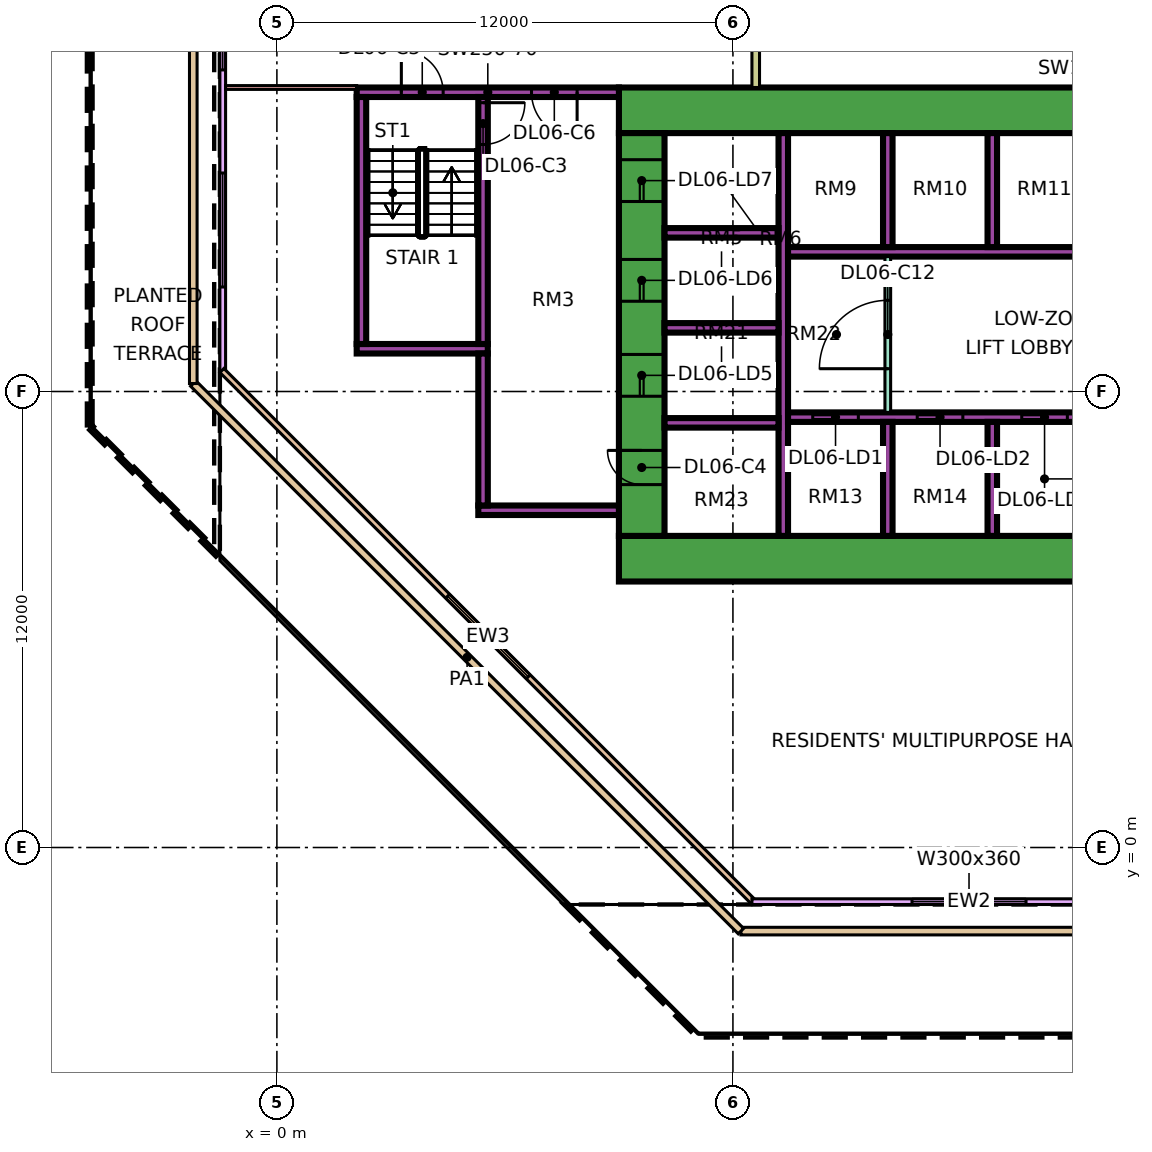
"""IFC4 building model, lengths in metres.
Left out: names, types, materials, properties, quantities, classifications, styles, units other than length and angle.
Written with IfcOpenShell. Run it as: python <this file> out.ifc"""

import sys

from ifc_helpers import new_model, si_unit, direction, frame, frame_2d, origin, place, context, subcontext, project, spatial, rectangle, extrude, element, fill, save


model = new_model("IFC4")
c1 = context("Model", 3, precision=1e-05, world=origin(), true_north=direction((0.0, 1.0)))
c2 = subcontext(c1, "Body", "Model", "MODEL_VIEW")
j1 = project(units=[si_unit("LENGTHUNIT", "METRE"), si_unit("PLANEANGLEUNIT", "RADIAN")], contexts=[c1])
p1 = place(None, origin())
s1 = spatial("IfcSite", under=j1, at=p1, CompositionType="ELEMENT")
p2 = place(p1, origin())
s2 = spatial("IfcBuilding", under=s1, at=p2, CompositionType="ELEMENT")
p3 = place(p2, frame((0.0, 0.0, 35.4)))
s3 = spatial("IfcBuildingStorey", under=s2, at=p3, CompositionType="ELEMENT", Elevation=35.4)
p4 = place(p3, frame((9.0, 7.6, 0.0), z_axis=(0.0, 0.0, 1.0), x_axis=(1.0, 0.0, 0.0)))
e1 = element("IfcWall", 1, at=p4, inside=s3, PredefinedType="SHEAR", context=c2, shape_type="SweptSolid", body=[
    extrude(rectangle(XDim=25.0, YDim=1.2, at=frame_2d((12.5, 0.0))), origin(), (0.0, 0.0, 1.0), 6.0),
])
p5 = place(p3, frame((9.0, 19.4, 0.0), z_axis=(0.0, 0.0, 1.0), x_axis=(1.0, 0.0, 0.0)))
e2 = element("IfcWall", 2, at=p5, inside=s3, PredefinedType="SHEAR", context=c2, shape_type="SweptSolid", body=[
    extrude(rectangle(XDim=25.0, YDim=1.2, at=frame_2d((12.5, 0.0))), origin(), (0.0, 0.0, 1.0), 6.0),
])
p6 = place(p5, frame((19.1, 0.0, 0.0)))
e3 = element("IfcOpeningElement", 3, at=p6, cuts=e2, PredefinedType="OPENING", context=c2, shape_type="SweptSolid", body=[
    extrude(rectangle(XDim=1.8, YDim=2.4, at=frame_2d((0.9, 1.2))), frame((0.0, 0.61, 0.0), z_axis=(0.0, -1.0, 0.0), x_axis=(1.0, 0.0, 0.0)), (0.0, 0.0, 1.0), 1.22),
])
p7 = place(p3, frame((9.6, 8.2, 0.0), z_axis=(0.0, 0.0, 1.0), x_axis=(0.0, 1.0, 0.0)))
e4 = element("IfcWall", 4, at=p7, inside=s3, PredefinedType="SHEAR", context=c2, shape_type="SweptSolid", body=[
    extrude(rectangle(XDim=10.6, YDim=1.2, at=frame_2d((5.3, 0.0))), origin(), (0.0, 0.0, 1.0), 6.0),
])
p8 = place(p7, frame((3.675, 0.0, 0.0)))
e5 = element("IfcOpeningElement", 5, at=p8, cuts=e4, PredefinedType="OPENING", context=c2, shape_type="SweptSolid", body=[
    extrude(rectangle(XDim=1.1, YDim=2.2, at=frame_2d((0.55, 1.1))), frame((0.0, 0.61, 0.0), z_axis=(0.0, -1.0, 0.0), x_axis=(1.0, 0.0, 0.0)), (0.0, 0.0, 1.0), 1.22),
])
p9 = place(p7, frame((6.175, 0.0, 0.0)))
e6 = element("IfcOpeningElement", 6, at=p9, cuts=e4, PredefinedType="OPENING", context=c2, shape_type="SweptSolid", body=[
    extrude(rectangle(XDim=1.1, YDim=2.2, at=frame_2d((0.55, 1.1))), frame((0.0, 0.61, 0.0), z_axis=(0.0, -1.0, 0.0), x_axis=(1.0, 0.0, 0.0)), (0.0, 0.0, 1.0), 1.22),
])
p10 = place(p7, frame((8.8, 0.0, 0.0)))
e7 = element("IfcOpeningElement", 7, at=p10, cuts=e4, PredefinedType="OPENING", context=c2, shape_type="SweptSolid", body=[
    extrude(rectangle(XDim=1.1, YDim=2.2, at=frame_2d((0.55, 1.1))), frame((0.0, 0.61, 0.0), z_axis=(0.0, -1.0, 0.0), x_axis=(1.0, 0.0, 0.0)), (0.0, 0.0, 1.0), 1.22),
])
p11 = place(p7, frame((1.35, 0.0, 0.0)))
e8 = element("IfcOpeningElement", 8, at=p11, cuts=e4, PredefinedType="OPENING", context=c2, shape_type="SweptSolid", body=[
    extrude(rectangle(XDim=0.9, YDim=2.1, at=frame_2d((0.45, 1.05))), frame((0.0, 0.61, 0.0), z_axis=(0.0, -1.0, 0.0), x_axis=(1.0, 0.0, 0.0)), (0.0, 0.0, 1.0), 1.22),
])
p12 = place(p3, frame((13.325, 8.2, 0.0), z_axis=(0.0, 0.0, 1.0), x_axis=(0.0, 1.0, 0.0)))
e9 = element("IfcWall", 9, at=p12, inside=s3, PredefinedType="SHEAR", context=c2, shape_type="SweptSolid", body=[
    extrude(rectangle(XDim=10.6, YDim=0.25, at=frame_2d((5.3, 0.0))), origin(), (0.0, 0.0, 1.0), 6.0),
])
p13 = place(p3, frame((13.45, 11.325, 0.0), z_axis=(0.0, 0.0, 1.0), x_axis=(1.0, 0.0, 0.0)))
e10 = element("IfcWall", 10, at=p13, inside=s3, PredefinedType="SHEAR", context=c2, shape_type="SweptSolid", body=[
    extrude(rectangle(XDim=19.35, YDim=0.25, at=frame_2d((9.675, 0.0))), origin(), (0.0, 0.0, 1.0), 6.0),
])
p14 = place(p13, frame((0.65, 0.0, 0.0)))
e11 = element("IfcOpeningElement", 11, at=p14, cuts=e10, PredefinedType="OPENING", context=c2, shape_type="SweptSolid", body=[
    extrude(rectangle(XDim=1.2, YDim=2.2, at=frame_2d((0.6, 1.1))), frame((0.0, 0.135, 0.0), z_axis=(0.0, -1.0, 0.0), x_axis=(1.0, 0.0, 0.0)), (0.0, 0.0, 1.0), 0.27),
])
p15 = place(p13, frame((3.4, 0.0, 0.0)))
e12 = element("IfcOpeningElement", 12, at=p15, cuts=e10, PredefinedType="OPENING", context=c2, shape_type="SweptSolid", body=[
    extrude(rectangle(XDim=1.2, YDim=2.2, at=frame_2d((0.6, 1.1))), frame((0.0, 0.135, 0.0), z_axis=(0.0, -1.0, 0.0), x_axis=(1.0, 0.0, 0.0)), (0.0, 0.0, 1.0), 0.27),
])
p16 = place(p13, frame((6.15, 0.0, 0.0)))
e13 = element("IfcOpeningElement", 13, at=p16, cuts=e10, PredefinedType="OPENING", context=c2, shape_type="SweptSolid", body=[
    extrude(rectangle(XDim=1.2, YDim=2.2, at=frame_2d((0.6, 1.1))), frame((0.0, 0.135, 0.0), z_axis=(0.0, -1.0, 0.0), x_axis=(1.0, 0.0, 0.0)), (0.0, 0.0, 1.0), 0.27),
])
p17 = place(p13, frame((8.9, 0.0, 0.0)))
e14 = element("IfcOpeningElement", 14, at=p17, cuts=e10, PredefinedType="OPENING", context=c2, shape_type="SweptSolid", body=[
    extrude(rectangle(XDim=1.2, YDim=2.2, at=frame_2d((0.6, 1.1))), frame((0.0, 0.135, 0.0), z_axis=(0.0, -1.0, 0.0), x_axis=(1.0, 0.0, 0.0)), (0.0, 0.0, 1.0), 0.27),
])
p18 = place(p3, frame((13.45, 15.675, 0.0), z_axis=(0.0, 0.0, 1.0), x_axis=(1.0, 0.0, 0.0)))
e15 = element("IfcWall", 15, at=p18, inside=s3, PredefinedType="SHEAR", context=c2, shape_type="SweptSolid", body=[
    extrude(rectangle(XDim=13.75, YDim=0.25, at=frame_2d((6.875, 0.0))), origin(), (0.0, 0.0, 1.0), 6.0),
])
for number, where, z_axis, x_axis in (
    (16, (10.2, 11.175, 0.0), (0.0, 0.0, 1.0), (1.0, 0.0, 0.0)),
    (17, (10.2, 13.675, 0.0), (0.0, 0.0, 1.0), (1.0, 0.0, 0.0)),
    (18, (10.2, 16.175, 0.0), (0.0, 0.0, 1.0), (1.0, 0.0, 0.0)),
    (19, (16.075, 8.2, 0.0), (0.0, 0.0, 1.0), (0.0, 1.0, 0.0)),
    (20, (18.825, 8.2, 0.0), (0.0, 0.0, 1.0), (0.0, 1.0, 0.0)),
    (21, (16.075, 15.8, 0.0), (0.0, 0.0, 1.0), (0.0, 1.0, 0.0)),
    (22, (18.825, 15.8, 0.0), (0.0, 0.0, 1.0), (0.0, 1.0, 0.0)),
):
    element("IfcWall", number, at=place(p3, frame(where, z_axis=z_axis, x_axis=x_axis)), inside=s3, PredefinedType="SHEAR", context=c2, shape_type="SweptSolid", body=[
        extrude(rectangle(XDim=3.0, YDim=0.25, at=frame_2d((1.5, 0.0))), origin(), (0.0, 0.0, 1.0), 6.0),
    ])
p19 = place(p3, frame((2.1, 19.875, 0.0), z_axis=(0.0, 0.0, 1.0), x_axis=(1.0, 0.0, 0.0)))
e23 = element("IfcWall", 23, at=p19, inside=s3, PredefinedType="SHEAR", context=c2, shape_type="SweptSolid", body=[
    extrude(rectangle(XDim=6.9, YDim=0.25, at=frame_2d((3.45, 0.0))), origin(), (0.0, 0.0, 1.0), 6.0),
])
p20 = place(p19, frame((1.175, 0.0, 0.0)))
e24 = element("IfcOpeningElement", 24, at=p20, cuts=e23, PredefinedType="OPENING", context=c2, shape_type="SweptSolid", body=[
    extrude(rectangle(XDim=1.1, YDim=2.2, at=frame_2d((0.55, 1.1))), frame((0.0, 0.135, 0.0), z_axis=(0.0, -1.0, 0.0), x_axis=(1.0, 0.0, 0.0)), (0.0, 0.0, 1.0), 0.27),
])
p21 = place(p19, frame((4.6, 0.0, 0.0)))
e25 = element("IfcOpeningElement", 25, at=p21, cuts=e23, PredefinedType="OPENING", context=c2, shape_type="SweptSolid", body=[
    extrude(rectangle(XDim=1.2, YDim=2.2, at=frame_2d((0.6, 1.1))), frame((0.0, 0.135, 0.0), z_axis=(0.0, -1.0, 0.0), x_axis=(1.0, 0.0, 0.0)), (0.0, 0.0, 1.0), 0.27),
])
p22 = place(p3, frame((2.1, 13.125, 0.0), z_axis=(0.0, 0.0, 1.0), x_axis=(1.0, 0.0, 0.0)))
e26 = element("IfcWall", 26, at=p22, inside=s3, PredefinedType="SHEAR", context=c2, shape_type="SweptSolid", body=[
    extrude(rectangle(XDim=3.45, YDim=0.25, at=frame_2d((1.725, 0.0))), origin(), (0.0, 0.0, 1.0), 6.0),
])
p23 = place(p3, frame((2.225, 13.25, 0.0), z_axis=(0.0, 0.0, 1.0), x_axis=(0.0, 1.0, 0.0)))
e27 = element("IfcWall", 27, at=p23, inside=s3, PredefinedType="SHEAR", context=c2, shape_type="SweptSolid", body=[
    extrude(rectangle(XDim=6.5, YDim=0.25, at=frame_2d((3.25, 0.0))), origin(), (0.0, 0.0, 1.0), 6.0),
])
p24 = place(p3, frame((5.425, 13.25, 0.0), z_axis=(0.0, 0.0, 1.0), x_axis=(0.0, 1.0, 0.0)))
e28 = element("IfcWall", 28, at=p24, inside=s3, PredefinedType="SHEAR", context=c2, shape_type="SweptSolid", body=[
    extrude(rectangle(XDim=6.5, YDim=0.25, at=frame_2d((3.25, 0.0))), origin(), (0.0, 0.0, 1.0), 6.0),
])
p25 = place(p24, frame((5.25, 0.0, 0.0)))
e29 = element("IfcOpeningElement", 29, at=p25, cuts=e28, PredefinedType="OPENING", context=c2, shape_type="SweptSolid", body=[
    extrude(rectangle(XDim=1.1, YDim=2.2, at=frame_2d((0.55, 1.1))), frame((0.0, 0.135, 0.0), z_axis=(0.0, -1.0, 0.0), x_axis=(1.0, 0.0, 0.0)), (0.0, 0.0, 1.0), 0.27),
])
p26 = place(p3, frame((5.3, 8.875, 0.0), z_axis=(0.0, 0.0, 1.0), x_axis=(1.0, 0.0, 0.0)))
e30 = element("IfcWall", 30, at=p26, inside=s3, PredefinedType="SHEAR", context=c2, shape_type="SweptSolid", body=[
    extrude(rectangle(XDim=3.7, YDim=0.25, at=frame_2d((1.85, 0.0))), origin(), (0.0, 0.0, 1.0), 6.0),
])
p27 = place(p3, frame((5.425, 9.0, 0.0), z_axis=(0.0, 0.0, 1.0), x_axis=(0.0, 1.0, 0.0)))
e31 = element("IfcWall", 31, at=p27, inside=s3, PredefinedType="SHEAR", context=c2, shape_type="SweptSolid", body=[
    extrude(rectangle(XDim=4.0, YDim=0.25, at=frame_2d((2.0, 0.0))), origin(), (0.0, 0.0, 1.0), 6.0),
])
p28 = place(p3, frame((-1.425, 23.925, 0.0), z_axis=(0.0, 0.0, 1.0), x_axis=(0.0, -1.0, 0.0)))
e32 = element("IfcWall", 32, at=p28, inside=s3, PredefinedType="SOLIDWALL", context=c2, shape_type="SweptSolid", body=[
    extrude(rectangle(XDim=11.425, YDim=0.15, at=frame_2d((5.712, 0.0))), origin(), (0.0, 0.0, 1.0), 5.6),
])
p29 = place(p28, frame((0.462, 0.0, 0.45)))
e33 = element("IfcOpeningElement", 33, at=p29, cuts=e32, PredefinedType="OPENING", context=c2, shape_type="SweptSolid", body=[
    extrude(rectangle(XDim=3.0, YDim=3.6, at=frame_2d((1.5, 1.8))), frame((0.0, 0.085, 0.0), z_axis=(0.0, -1.0, 0.0), x_axis=(1.0, 0.0, 0.0)), (0.0, 0.0, 1.0), 0.17),
])
p30 = place(p28, frame((6.175, 0.0, 0.45)))
e34 = element("IfcOpeningElement", 34, at=p30, cuts=e32, PredefinedType="OPENING", context=c2, shape_type="SweptSolid", body=[
    extrude(rectangle(XDim=3.0, YDim=3.6, at=frame_2d((1.5, 1.8))), frame((0.0, 0.085, 0.0), z_axis=(0.0, -1.0, 0.0), x_axis=(1.0, 0.0, 0.0)), (0.0, 0.0, 1.0), 0.17),
])
p31 = place(p3, frame((-1.447, 12.553, 0.0), z_axis=(0.0, 0.0, 1.0), x_axis=(0.707106781187, -0.707106781187, 0.0)))
e35 = element("IfcWall", 35, at=p31, inside=s3, PredefinedType="SOLIDWALL", context=c2, shape_type="SweptSolid", body=[
    extrude(rectangle(XDim=19.799, YDim=0.15, at=frame_2d((9.899, 0.0))), origin(), (0.0, 0.0, 1.0), 5.6),
])
p32 = place(p31, frame((8.399, 0.0, 0.45)))
e36 = element("IfcOpeningElement", 36, at=p32, cuts=e35, PredefinedType="OPENING", context=c2, shape_type="SweptSolid", body=[
    extrude(rectangle(XDim=3.0, YDim=3.6, at=frame_2d((1.5, 1.8))), frame((0.0, 0.085, 0.0), z_axis=(0.0, -1.0, 0.0), x_axis=(1.0, 0.0, 0.0)), (0.0, 0.0, 1.0), 0.17),
])
p33 = place(p3, frame((12.5, -1.425, 0.0), z_axis=(0.0, 0.0, 1.0), x_axis=(1.0, 0.0, 0.0)))
e37 = element("IfcWall", 37, at=p33, inside=s3, PredefinedType="SOLIDWALL", context=c2, shape_type="SweptSolid", body=[
    extrude(rectangle(XDim=11.425, YDim=0.15, at=frame_2d((5.712, 0.0))), origin(), (0.0, 0.0, 1.0), 5.6),
])
p34 = place(p33, frame((4.212, 0.0, 0.45)))
e38 = element("IfcOpeningElement", 38, at=p34, cuts=e37, PredefinedType="OPENING", context=c2, shape_type="SweptSolid", body=[
    extrude(rectangle(XDim=3.0, YDim=3.6, at=frame_2d((1.5, 1.8))), frame((0.0, 0.085, 0.0), z_axis=(0.0, -1.0, 0.0), x_axis=(1.0, 0.0, 0.0)), (0.0, 0.0, 1.0), 0.17),
])
p35 = place(p3, frame((70.79, -2.2, 0.0), z_axis=(0.0, 0.0, 1.0), x_axis=(-1.0, 0.0, 0.0)))
e39 = element("IfcWall", 39, at=p35, inside=s3, PredefinedType="PARAPET", context=c2, shape_type="SweptSolid", body=[
    extrude(rectangle(XDim=58.58, YDim=0.2, at=frame_2d((29.29, 0.0))), origin(), (0.0, 0.0, 1.0), 0.5),
])
p36 = place(p3, frame((12.21, -2.2, 0.0), z_axis=(0.0, 0.0, 1.0), x_axis=(-0.707106781187, 0.707106781187, 0.0)))
e40 = element("IfcWall", 40, at=p36, inside=s3, PredefinedType="PARAPET", context=c2, shape_type="SweptSolid", body=[
    extrude(rectangle(XDim=20.379, YDim=0.2, at=frame_2d((10.189, 0.0))), origin(), (0.0, 0.0, 1.0), 0.5),
])
p37 = place(p3, frame((-2.2, 12.21, 0.0), z_axis=(0.0, 0.0, 1.0), x_axis=(0.0, 1.0, 0.0)))
e41 = element("IfcWall", 41, at=p37, inside=s3, PredefinedType="PARAPET", context=c2, shape_type="SweptSolid", body=[
    extrude(rectangle(XDim=49.58, YDim=0.2, at=frame_2d((24.79, 0.0))), origin(), (0.0, 0.0, 1.0), 0.5),
])
p38 = place(p3, frame((16.075, 11.45, 0.0), z_axis=(0.0, 0.0, 1.0), x_axis=(0.0, 1.0, 0.0)))
e42 = element("IfcWall", 42, at=p38, inside=s3, PredefinedType="PARTITIONING", context=c2, shape_type="SweptSolid", body=[
    extrude(rectangle(XDim=4.1, YDim=0.15, at=frame_2d((2.05, 0.0))), origin(), (0.0, 0.0, 1.0), 5.6),
])
p39 = place(p38, frame((1.15, 0.0, 0.0)))
e43 = element("IfcOpeningElement", 43, at=p39, cuts=e42, PredefinedType="OPENING", context=c2, shape_type="SweptSolid", body=[
    extrude(rectangle(XDim=1.8, YDim=2.4, at=frame_2d((0.9, 1.2))), frame((0.0, 0.085, 0.0), z_axis=(0.0, -1.0, 0.0), x_axis=(1.0, 0.0, 0.0)), (0.0, 0.0, 1.0), 0.17),
])
p40 = place(p3, frame((-1.351, 20.0, 0.0), z_axis=(0.0, 0.0, 1.0), x_axis=(1.0, 0.0, 0.0)))
e44 = element("IfcWall", 44, at=p40, inside=s3, PredefinedType="PARTITIONING", context=c2, shape_type="SweptSolid", body=[
    extrude(rectangle(XDim=3.451, YDim=0.1, at=frame_2d((1.726, 0.0))), origin(), (0.0, 0.0, 1.0), 5.6),
])
p41 = place(p3, frame((12.6, 20.0, 0.0), z_axis=(0.0, 0.0, 1.0), x_axis=(0.0, 1.0, 0.0)))
e45 = element("IfcWall", 45, at=p41, inside=s3, PredefinedType="PARTITIONING", context=c2, shape_type="SweptSolid", body=[
    extrude(rectangle(XDim=6.0, YDim=0.2, at=frame_2d((3.0, 0.0))), origin(), (0.0, 0.0, 1.0), 5.6),
])
p42 = place(p41, frame((4.85, 0.0, 0.0)))
e46 = element("IfcOpeningElement", 46, at=p42, cuts=e45, PredefinedType="OPENING", context=c2, shape_type="SweptSolid", body=[
    extrude(rectangle(XDim=1.0, YDim=2.1, at=frame_2d((0.5, 1.05))), frame((0.0, 0.11, 0.0), z_axis=(0.0, -1.0, 0.0), x_axis=(1.0, 0.0, 0.0)), (0.0, 0.0, 1.0), 0.22),
])
p43 = place(p41, frame((1.1, 0.0, 0.0)))
e47 = element("IfcOpeningElement", 47, at=p43, cuts=e45, PredefinedType="OPENING", context=c2, shape_type="SweptSolid", body=[
    extrude(rectangle(XDim=1.0, YDim=2.1, at=frame_2d((0.5, 1.05))), frame((0.0, 0.11, 0.0), z_axis=(0.0, -1.0, 0.0), x_axis=(1.0, 0.0, 0.0)), (0.0, 0.0, 1.0), 0.22),
])
p44 = place(p29, origin())
e48 = element("IfcWindow", 48, at=p44, inside=s3, PartitioningType="SINGLE_PANEL", PredefinedType="WINDOW", context=c2, shape_type="SweptSolid", body=[
    extrude(rectangle(XDim=3.0, YDim=3.6, at=frame_2d((1.5, 1.8))), frame((0.0, 0.03, 0.0), z_axis=(0.0, -1.0, 0.0), x_axis=(1.0, 0.0, 0.0)), (0.0, 0.0, 1.0), 0.06),
])
fill(e33, e48)
p45 = place(p30, origin())
e49 = element("IfcWindow", 49, at=p45, inside=s3, PartitioningType="SINGLE_PANEL", PredefinedType="WINDOW", context=c2, shape_type="SweptSolid", body=[
    extrude(rectangle(XDim=3.0, YDim=3.6, at=frame_2d((1.5, 1.8))), frame((0.0, 0.03, 0.0), z_axis=(0.0, -1.0, 0.0), x_axis=(1.0, 0.0, 0.0)), (0.0, 0.0, 1.0), 0.06),
])
fill(e34, e49)
p46 = place(p32, origin())
e50 = element("IfcWindow", 50, at=p46, inside=s3, PartitioningType="SINGLE_PANEL", PredefinedType="WINDOW", context=c2, shape_type="SweptSolid", body=[
    extrude(rectangle(XDim=3.0, YDim=3.6, at=frame_2d((1.5, 1.8))), frame((0.0, 0.03, 0.0), z_axis=(0.0, -1.0, 0.0), x_axis=(1.0, 0.0, 0.0)), (0.0, 0.0, 1.0), 0.06),
])
fill(e36, e50)
p47 = place(p34, origin())
e51 = element("IfcWindow", 51, at=p47, inside=s3, PartitioningType="SINGLE_PANEL", PredefinedType="WINDOW", context=c2, shape_type="SweptSolid", body=[
    extrude(rectangle(XDim=3.0, YDim=3.6, at=frame_2d((1.5, 1.8))), frame((0.0, 0.03, 0.0), z_axis=(0.0, -1.0, 0.0), x_axis=(1.0, 0.0, 0.0)), (0.0, 0.0, 1.0), 0.06),
])
fill(e38, e51)
p48 = place(p14, origin())
e52 = element("IfcDoor", 52, at=p48, inside=s3, OperationType="DOUBLE_DOOR_SLIDING", PredefinedType="DOOR", context=c2, shape_type="SweptSolid", body=[
    extrude(rectangle(XDim=1.2, YDim=2.2, at=frame_2d((0.6, 1.1))), frame((0.0, 0.025, 0.0), z_axis=(0.0, -1.0, 0.0), x_axis=(1.0, 0.0, 0.0)), (0.0, 0.0, 1.0), 0.05),
])
fill(e11, e52)
p49 = place(p15, origin())
e53 = element("IfcDoor", 53, at=p49, inside=s3, OperationType="DOUBLE_DOOR_SLIDING", PredefinedType="DOOR", context=c2, shape_type="SweptSolid", body=[
    extrude(rectangle(XDim=1.2, YDim=2.2, at=frame_2d((0.6, 1.1))), frame((0.0, 0.025, 0.0), z_axis=(0.0, -1.0, 0.0), x_axis=(1.0, 0.0, 0.0)), (0.0, 0.0, 1.0), 0.05),
])
fill(e12, e53)
p50 = place(p16, origin())
e54 = element("IfcDoor", 54, at=p50, inside=s3, OperationType="DOUBLE_DOOR_SLIDING", PredefinedType="DOOR", context=c2, shape_type="SweptSolid", body=[
    extrude(rectangle(XDim=1.2, YDim=2.2, at=frame_2d((0.6, 1.1))), frame((0.0, 0.025, 0.0), z_axis=(0.0, -1.0, 0.0), x_axis=(1.0, 0.0, 0.0)), (0.0, 0.0, 1.0), 0.05),
])
fill(e13, e54)
p51 = place(p8, origin())
e55 = element("IfcDoor", 55, at=p51, inside=s3, OperationType="DOUBLE_DOOR_SLIDING", PredefinedType="DOOR", context=c2, shape_type="SweptSolid", body=[
    extrude(rectangle(XDim=1.1, YDim=2.2, at=frame_2d((0.55, 1.1))), frame((0.0, 0.025, 0.0), z_axis=(0.0, -1.0, 0.0), x_axis=(1.0, 0.0, 0.0)), (0.0, 0.0, 1.0), 0.05),
])
fill(e5, e55)
p52 = place(p9, origin())
e56 = element("IfcDoor", 56, at=p52, inside=s3, OperationType="DOUBLE_DOOR_SLIDING", PredefinedType="DOOR", context=c2, shape_type="SweptSolid", body=[
    extrude(rectangle(XDim=1.1, YDim=2.2, at=frame_2d((0.55, 1.1))), frame((0.0, 0.025, 0.0), z_axis=(0.0, -1.0, 0.0), x_axis=(1.0, 0.0, 0.0)), (0.0, 0.0, 1.0), 0.05),
])
fill(e6, e56)
p53 = place(p10, origin())
e57 = element("IfcDoor", 57, at=p53, inside=s3, OperationType="DOUBLE_DOOR_SLIDING", PredefinedType="DOOR", context=c2, shape_type="SweptSolid", body=[
    extrude(rectangle(XDim=1.1, YDim=2.2, at=frame_2d((0.55, 1.1))), frame((0.0, 0.025, 0.0), z_axis=(0.0, -1.0, 0.0), x_axis=(1.0, 0.0, 0.0)), (0.0, 0.0, 1.0), 0.05),
])
fill(e7, e57)
p54 = place(p25, origin())
e58 = element("IfcDoor", 58, at=p54, inside=s3, OperationType="SINGLE_SWING_RIGHT", PredefinedType="DOOR", context=c2, shape_type="SweptSolid", body=[
    extrude(rectangle(XDim=1.1, YDim=2.2, at=frame_2d((0.55, 1.1))), frame((0.0, 0.025, 0.0), z_axis=(0.0, -1.0, 0.0), x_axis=(1.0, 0.0, 0.0)), (0.0, 0.0, 1.0), 0.05),
])
fill(e29, e58)
p55 = place(p11, frame((0.9, 0.0, 0.0), z_axis=(0.0, 0.0, 1.0), x_axis=(-1.0, 0.0, 0.0)))
e59 = element("IfcDoor", 59, at=p55, inside=s3, OperationType="SINGLE_SWING_RIGHT", PredefinedType="DOOR", context=c2, shape_type="SweptSolid", body=[
    extrude(rectangle(XDim=0.9, YDim=2.1, at=frame_2d((0.45, 1.05))), frame((0.0, 0.025, 0.0), z_axis=(0.0, -1.0, 0.0), x_axis=(1.0, 0.0, 0.0)), (0.0, 0.0, 1.0), 0.05),
])
fill(e8, e59)
p56 = place(p20, origin())
e60 = element("IfcDoor", 60, at=p56, inside=s3, OperationType="SINGLE_SWING_LEFT", PredefinedType="DOOR", context=c2, shape_type="SweptSolid", body=[
    extrude(rectangle(XDim=1.1, YDim=2.2, at=frame_2d((0.55, 1.1))), frame((0.0, 0.025, 0.0), z_axis=(0.0, -1.0, 0.0), x_axis=(1.0, 0.0, 0.0)), (0.0, 0.0, 1.0), 0.05),
])
fill(e24, e60)
p57 = place(p21, origin())
e61 = element("IfcDoor", 61, at=p57, inside=s3, OperationType="SINGLE_SWING_RIGHT", PredefinedType="DOOR", context=c2, shape_type="SweptSolid", body=[
    extrude(rectangle(XDim=1.2, YDim=2.2, at=frame_2d((0.6, 1.1))), frame((0.0, 0.025, 0.0), z_axis=(0.0, -1.0, 0.0), x_axis=(1.0, 0.0, 0.0)), (0.0, 0.0, 1.0), 0.05),
])
fill(e25, e61)
p58 = place(p39, origin())
e62 = element("IfcDoor", 62, at=p58, inside=s3, OperationType="DOUBLE_DOOR_SINGLE_SWING", PredefinedType="DOOR", context=c2, shape_type="SweptSolid", body=[
    extrude(rectangle(XDim=1.8, YDim=2.4, at=frame_2d((0.9, 1.2))), frame((0.0, 0.025, 0.0), z_axis=(0.0, -1.0, 0.0), x_axis=(1.0, 0.0, 0.0)), (0.0, 0.0, 1.0), 0.05),
])
fill(e43, e62)
save(model, sys.argv[1])
